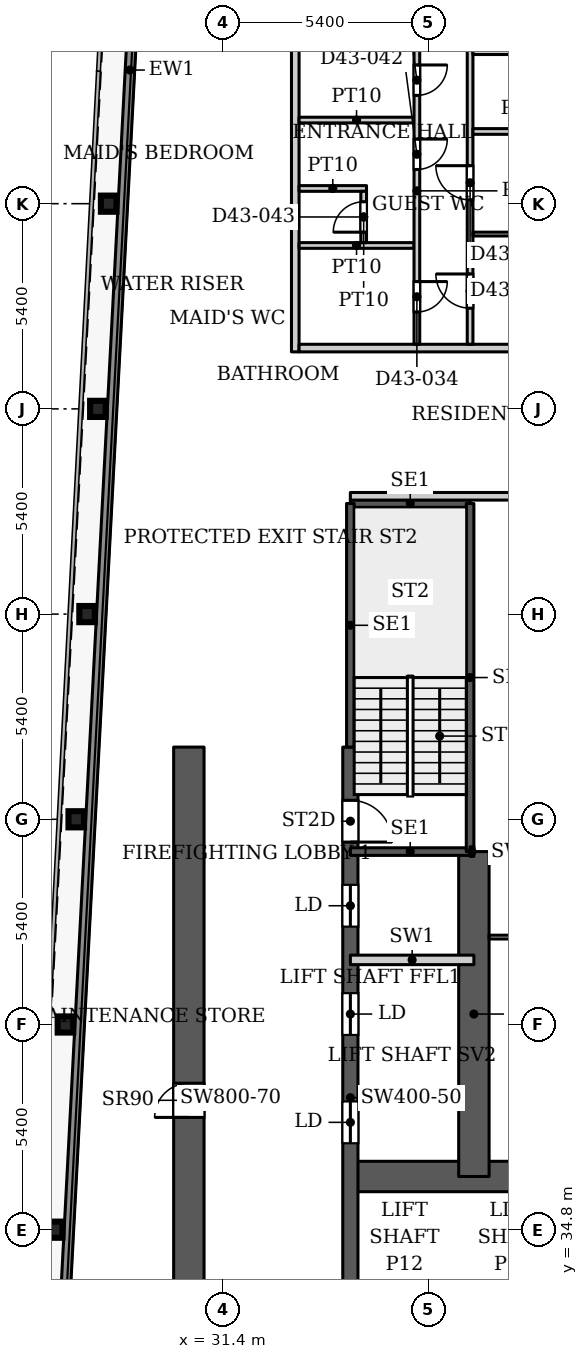
"""IFC4 building model, lengths in metres.
Left out: names, types, materials, properties, quantities, classifications, styles, units other than length and angle.
Written with IfcOpenShell. Run it as: python <this file> out.ifc"""

import sys

from ifc_helpers import new_model, si_unit, direction, frame, frame_2d, origin, origin_2d, place, context, subcontext, project, spatial, rectangle, i_section, extrude, source, transform, mapped, element, fill, save


model = new_model("IFC4")
c1 = context("Model", 3, precision=1e-05, world=origin(), true_north=direction((0.0, 1.0)))
c2 = subcontext(c1, "Body", "Model", "MODEL_VIEW")
j1 = project(units=[si_unit("LENGTHUNIT", "METRE"), si_unit("PLANEANGLEUNIT", "RADIAN")], contexts=[c1])
p1 = place(None, origin())
s1 = spatial("IfcSite", under=j1, at=p1, CompositionType="ELEMENT")
p2 = place(p1, origin())
s2 = spatial("IfcBuilding", under=s1, at=p2, CompositionType="ELEMENT")
p3 = place(p2, frame((0.0, 0.0, 191.6)))
s3 = spatial("IfcBuildingStorey", under=s2, at=p3, CompositionType="ELEMENT", Elevation=191.6)
for number, where, z_axis, x_axis in (
    (1, (26.969, 34.8, 0.0), (0.0, 0.0, 1.0), (1.0, 0.0, 0.0)),
    (2, (27.253, 40.2, 0.0), (0.0, 0.0, 1.0), (1.0, 0.0, 0.0)),
    (3, (27.537, 45.6, 0.0), (0.0, 0.0, 1.0), (1.0, 0.0, 0.0)),
    (4, (27.822, 51.0, 0.0), (0.0, 0.0, 1.0), (1.0, 0.0, 0.0)),
    (5, (28.106, 56.4, 0.0), (0.0, 0.0, 1.0), (1.0, 0.0, 0.0)),
    (6, (28.39, 61.8, 0.0), (0.0, 0.0, 1.0), (1.0, 0.0, 0.0)),
):
    element("IfcColumn", number, at=place(p3, frame(where, z_axis=z_axis, x_axis=x_axis)), inside=s3, PredefinedType="COLUMN", context=c2, shape_type="SweptSolid", body=[
        extrude(i_section(OverallWidth=0.409, OverallDepth=0.425, WebThickness=0.033, FlangeThickness=0.052, FilletRadius=0.013, at=origin_2d()), origin(), (0.0, 0.0, 1.0), 3.9),
    ])
p4 = place(p3, frame((34.75, 36.2, 0.0), z_axis=(0.0, 0.0, 1.0), x_axis=(1.0, 0.0, 0.0)))
e7 = element("IfcWall", 7, at=p4, inside=s3, PredefinedType="SHEAR", context=c2, shape_type="SweptSolid", body=[
    extrude(rectangle(XDim=18.4, YDim=0.8, at=frame_2d((9.2, 0.0))), origin(), (0.0, 0.0, 1.0), 3.9),
])
p5 = place(p4, frame((16.9, 0.0, 0.0)))
e8 = element("IfcOpeningElement", 8, at=p5, cuts=e7, PredefinedType="OPENING", context=c2, shape_type="SweptSolid", body=[
    extrude(rectangle(XDim=1.0, YDim=2.2, at=frame_2d((0.5, 1.1))), frame((0.0, 0.41, 0.0), z_axis=(0.0, -1.0, 0.0), x_axis=(1.0, 0.0, 0.0)), (0.0, 0.0, 1.0), 0.82),
])
p6 = place(p3, frame((34.75, 29.05, 0.0), z_axis=(0.0, 0.0, 1.0), x_axis=(0.0, 1.0, 0.0)))
e9 = element("IfcWall", 9, at=p6, inside=s3, PredefinedType="SHEAR", context=c2, shape_type="SweptSolid", body=[
    extrude(rectangle(XDim=18.45, YDim=0.4, at=frame_2d((9.225, 0.0))), origin(), (0.0, 0.0, 1.0), 3.9),
])
p7 = place(p6, frame((8.025, 0.0, 0.0)))
e10 = element("IfcOpeningElement", 10, at=p7, cuts=e9, PredefinedType="OPENING", context=c2, shape_type="SweptSolid", body=[
    extrude(rectangle(XDim=1.1, YDim=2.2, at=frame_2d((0.55, 1.1))), frame((0.0, 0.21, 0.0), z_axis=(0.0, -1.0, 0.0), x_axis=(1.0, 0.0, 0.0)), (0.0, 0.0, 1.0), 0.42),
])
p8 = place(p6, frame((10.875, 0.0, 0.0)))
e11 = element("IfcOpeningElement", 11, at=p8, cuts=e9, PredefinedType="OPENING", context=c2, shape_type="SweptSolid", body=[
    extrude(rectangle(XDim=1.1, YDim=2.2, at=frame_2d((0.55, 1.1))), frame((0.0, 0.21, 0.0), z_axis=(0.0, -1.0, 0.0), x_axis=(1.0, 0.0, 0.0)), (0.0, 0.0, 1.0), 0.42),
])
p9 = place(p6, frame((13.725, 0.0, 0.0)))
e12 = element("IfcOpeningElement", 12, at=p9, cuts=e9, PredefinedType="OPENING", context=c2, shape_type="SweptSolid", body=[
    extrude(rectangle(XDim=1.1, YDim=2.2, at=frame_2d((0.55, 1.1))), frame((0.0, 0.21, 0.0), z_axis=(0.0, -1.0, 0.0), x_axis=(1.0, 0.0, 0.0)), (0.0, 0.0, 1.0), 0.42),
])
p10 = place(p6, frame((15.95, 0.0, 0.0)))
e13 = element("IfcOpeningElement", 13, at=p10, cuts=e9, PredefinedType="OPENING", context=c2, shape_type="SweptSolid", body=[
    extrude(rectangle(XDim=1.1, YDim=2.2, at=frame_2d((0.55, 1.1))), frame((0.0, 0.21, 0.0), z_axis=(0.0, -1.0, 0.0), x_axis=(1.0, 0.0, 0.0)), (0.0, 0.0, 1.0), 0.42),
])
p11 = place(p3, frame((38.0, 36.2, 0.0), z_axis=(0.0, 0.0, 1.0), x_axis=(0.0, 1.0, 0.0)))
e14 = element("IfcWall", 14, at=p11, inside=s3, PredefinedType="SHEAR", context=c2, shape_type="SweptSolid", body=[
    extrude(rectangle(XDim=8.55, YDim=0.8, at=frame_2d((4.275, 0.0))), origin(), (0.0, 0.0, 1.0), 3.9),
])
p12 = place(p3, frame((30.5, 29.05, 0.0), z_axis=(0.0, 0.0, 1.0), x_axis=(0.0, 1.0, 0.0)))
e15 = element("IfcWall", 15, at=p12, inside=s3, PredefinedType="SHEAR", context=c2, shape_type="SweptSolid", body=[
    extrude(rectangle(XDim=18.45, YDim=0.8, at=frame_2d((9.225, 0.0))), origin(), (0.0, 0.0, 1.0), 3.9),
])
p13 = place(p12, frame((1.5, 0.0, 0.0)))
e16 = element("IfcOpeningElement", 16, at=p13, cuts=e15, PredefinedType="OPENING", context=c2, shape_type="SweptSolid", body=[
    extrude(rectangle(XDim=0.9, YDim=2.2, at=frame_2d((0.45, 1.1))), frame((0.0, 0.41, 0.0), z_axis=(0.0, -1.0, 0.0), x_axis=(1.0, 0.0, 0.0)), (0.0, 0.0, 1.0), 0.82),
])
p14 = place(p12, frame((8.705, 0.0, 0.0)))
e17 = element("IfcOpeningElement", 17, at=p14, cuts=e15, PredefinedType="OPENING", context=c2, shape_type="SweptSolid", body=[
    extrude(rectangle(XDim=0.9, YDim=2.2, at=frame_2d((0.45, 1.1))), frame((0.0, 0.41, 0.0), z_axis=(0.0, -1.0, 0.0), x_axis=(1.0, 0.0, 0.0)), (0.0, 0.0, 1.0), 0.82),
])
p15 = place(p3, frame((27.195, 31.969, 0.0), z_axis=(0.0, 0.0, 1.0), x_axis=(0.052554995867, 0.998618031286, 0.0)))
e18 = element("IfcWall", 18, at=p15, inside=s3, PredefinedType="SOLIDWALL", context=c2, shape_type="SweptSolid", body=[
    extrude(rectangle(XDim=66.787, YDim=0.25, at=frame_2d((33.394, 0.0))), origin(), (0.0, 0.0, 1.0), 3.75),
])
for number, where, z_axis, x_axis in (
    (19, (34.75, 44.75, 0.0), (0.0, 0.0, 1.0), (1.0, 0.0, 0.0)),
    (20, (34.75, 53.91, 0.0), (0.0, 0.0, 1.0), (1.0, 0.0, 0.0)),
):
    element("IfcWall", number, at=place(p3, frame(where, z_axis=z_axis, x_axis=x_axis)), inside=s3, PredefinedType="SHEAR", context=c2, shape_type="SweptSolid", body=[
        extrude(rectangle(XDim=3.15, YDim=0.2, at=frame_2d((1.575, 0.0))), origin(), (0.0, 0.0, 1.0), 3.9),
    ])
p16 = place(p3, frame((34.75, 47.5, 0.0), z_axis=(0.0, 0.0, 1.0), x_axis=(0.0, 1.0, 0.0)))
e21 = element("IfcWall", 21, at=p16, inside=s3, PredefinedType="SHEAR", context=c2, shape_type="SweptSolid", body=[
    extrude(rectangle(XDim=6.41, YDim=0.2, at=frame_2d((3.205, 0.0))), origin(), (0.0, 0.0, 1.0), 3.9),
])
p17 = place(p3, frame((37.9, 44.75, 0.0), z_axis=(0.0, 0.0, 1.0), x_axis=(0.0, 1.0, 0.0)))
e22 = element("IfcWall", 22, at=p17, inside=s3, PredefinedType="SHEAR", context=c2, shape_type="SweptSolid", body=[
    extrude(rectangle(XDim=9.16, YDim=0.2, at=frame_2d((4.58, 0.0))), origin(), (0.0, 0.0, 1.0), 3.9),
])
p18 = place(p3, frame((34.75, 41.9, 0.0), z_axis=(0.0, 0.0, 1.0), x_axis=(1.0, 0.0, 0.0)))
e23 = element("IfcWall", 23, at=p18, inside=s3, PredefinedType="PARTITIONING", context=c2, shape_type="SweptSolid", body=[
    extrude(rectangle(XDim=3.25, YDim=0.25, at=frame_2d((1.625, 0.0))), origin(), (0.0, 0.0, 1.0), 3.9),
])
p19 = place(p3, frame((37.9, 44.75, 0.0), z_axis=(0.0, 0.0, 1.0), x_axis=(1.0, 0.0, 0.0)))
e24 = element("IfcWall", 24, at=p19, inside=s3, PredefinedType="PARTITIONING", context=c2, shape_type="SweptSolid", body=[
    extrude(rectangle(XDim=0.1, YDim=0.25, at=frame_2d((0.05, 0.0))), origin(), (0.0, 0.0, 1.0), 3.9),
])
p20 = place(p3, frame((33.3, 57.9, 0.0), z_axis=(0.0, 0.0, 1.0), x_axis=(0.0, 1.0, 0.0)))
e25 = element("IfcWall", 25, at=p20, inside=s3, PredefinedType="PARTITIONING", context=c2, shape_type="SweptSolid", body=[
    extrude(rectangle(XDim=17.6, YDim=0.2, at=frame_2d((8.8, 0.0))), origin(), (0.0, 0.0, 1.0), 3.6),
])
p21 = place(p20, frame((8.9, 0.0, 0.0)))
e26 = element("IfcOpeningElement", 26, at=p21, cuts=e25, PredefinedType="OPENING", context=c2, shape_type="SweptSolid", body=[
    extrude(rectangle(XDim=1.0, YDim=2.1, at=frame_2d((0.5, 1.05))), frame((0.0, 0.11, 0.0), z_axis=(0.0, -1.0, 0.0), x_axis=(1.0, 0.0, 0.0)), (0.0, 0.0, 1.0), 0.22),
])
p22 = place(p3, frame((33.4, 58.0, 0.0), z_axis=(0.0, 0.0, 1.0), x_axis=(1.0, 0.0, 0.0)))
e27 = element("IfcWall", 27, at=p22, inside=s3, PredefinedType="PARTITIONING", context=c2, shape_type="SweptSolid", body=[
    extrude(rectangle(XDim=12.5, YDim=0.2, at=frame_2d((6.25, 0.0))), origin(), (0.0, 0.0, 1.0), 3.6),
])
p23 = place(p3, frame((33.4, 60.7, 0.0), z_axis=(0.0, 0.0, 1.0), x_axis=(1.0, 0.0, 0.0)))
e28 = element("IfcWall", 28, at=p23, inside=s3, PredefinedType="PARTITIONING", context=c2, shape_type="SweptSolid", body=[
    extrude(rectangle(XDim=3.025, YDim=0.15, at=frame_2d((1.513, 0.0))), origin(), (0.0, 0.0, 1.0), 3.6),
])
p24 = place(p3, frame((33.4, 62.2, 0.0), z_axis=(0.0, 0.0, 1.0), x_axis=(1.0, 0.0, 0.0)))
e29 = element("IfcWall", 29, at=p24, inside=s3, PredefinedType="PARTITIONING", context=c2, shape_type="SweptSolid", body=[
    extrude(rectangle(XDim=1.775, YDim=0.15, at=frame_2d((0.888, 0.0))), origin(), (0.0, 0.0, 1.0), 3.6),
])
p25 = place(p3, frame((33.4, 64.0, 0.0), z_axis=(0.0, 0.0, 1.0), x_axis=(1.0, 0.0, 0.0)))
e30 = element("IfcWall", 30, at=p25, inside=s3, PredefinedType="PARTITIONING", context=c2, shape_type="SweptSolid", body=[
    extrude(rectangle(XDim=3.025, YDim=0.15, at=frame_2d((1.513, 0.0))), origin(), (0.0, 0.0, 1.0), 3.6),
])
p26 = place(p3, frame((34.75, 54.1, 0.0), z_axis=(0.0, 0.0, 1.0), x_axis=(1.0, 0.0, 0.0)))
e31 = element("IfcWall", 31, at=p26, inside=s3, PredefinedType="PARTITIONING", context=c2, shape_type="SweptSolid", body=[
    extrude(rectangle(XDim=11.15, YDim=0.2, at=frame_2d((5.575, 0.0))), origin(), (0.0, 0.0, 1.0), 3.6),
])
p27 = place(p26, frame((5.075, 0.0, 0.0)))
e32 = element("IfcOpeningElement", 32, at=p27, cuts=e31, PredefinedType="OPENING", context=c2, shape_type="SweptSolid", body=[
    extrude(rectangle(XDim=1.0, YDim=2.1, at=frame_2d((0.5, 1.05))), frame((0.0, 0.11, 0.0), z_axis=(0.0, -1.0, 0.0), x_axis=(1.0, 0.0, 0.0)), (0.0, 0.0, 1.0), 0.22),
])
p28 = place(p3, frame((35.1, 60.775, 0.0), z_axis=(0.0, 0.0, 1.0), x_axis=(0.0, 1.0, 0.0)))
e33 = element("IfcWall", 33, at=p28, inside=s3, PredefinedType="PARTITIONING", context=c2, shape_type="SweptSolid", body=[
    extrude(rectangle(XDim=1.35, YDim=0.15, at=frame_2d((0.675, 0.0))), origin(), (0.0, 0.0, 1.0), 3.6),
])
p29 = place(p28, frame((0.275, 0.0, 0.0)))
e34 = element("IfcOpeningElement", 34, at=p29, cuts=e33, PredefinedType="OPENING", context=c2, shape_type="SweptSolid", body=[
    extrude(rectangle(XDim=0.8, YDim=2.1, at=frame_2d((0.4, 1.05))), frame((0.0, 0.085, 0.0), z_axis=(0.0, -1.0, 0.0), x_axis=(1.0, 0.0, 0.0)), (0.0, 0.0, 1.0), 0.17),
])
p30 = place(p3, frame((36.5, 58.1, 0.0), z_axis=(0.0, 0.0, 1.0), x_axis=(0.0, 1.0, 0.0)))
e35 = element("IfcWall", 35, at=p30, inside=s3, PredefinedType="PARTITIONING", context=c2, shape_type="SweptSolid", body=[
    extrude(rectangle(XDim=8.075, YDim=0.15, at=frame_2d((4.038, 0.0))), origin(), (0.0, 0.0, 1.0), 3.6),
])
p31 = place(p30, frame((0.85, 0.0, 0.0)))
e36 = element("IfcOpeningElement", 36, at=p31, cuts=e35, PredefinedType="OPENING", context=c2, shape_type="SweptSolid", body=[
    extrude(rectangle(XDim=0.8, YDim=2.1, at=frame_2d((0.4, 1.05))), frame((0.0, 0.085, 0.0), z_axis=(0.0, -1.0, 0.0), x_axis=(1.0, 0.0, 0.0)), (0.0, 0.0, 1.0), 0.17),
])
p32 = place(p30, frame((4.6, 0.0, 0.0)))
e37 = element("IfcOpeningElement", 37, at=p32, cuts=e35, PredefinedType="OPENING", context=c2, shape_type="SweptSolid", body=[
    extrude(rectangle(XDim=0.8, YDim=2.1, at=frame_2d((0.4, 1.05))), frame((0.0, 0.085, 0.0), z_axis=(0.0, -1.0, 0.0), x_axis=(1.0, 0.0, 0.0)), (0.0, 0.0, 1.0), 0.17),
])
p33 = place(p30, frame((6.55, 0.0, 0.0)))
e38 = element("IfcOpeningElement", 38, at=p33, cuts=e35, PredefinedType="OPENING", context=c2, shape_type="SweptSolid", body=[
    extrude(rectangle(XDim=0.8, YDim=2.1, at=frame_2d((0.4, 1.05))), frame((0.0, 0.085, 0.0), z_axis=(0.0, -1.0, 0.0), x_axis=(1.0, 0.0, 0.0)), (0.0, 0.0, 1.0), 0.17),
])
p34 = place(p3, frame((37.9, 58.1, 0.0), z_axis=(0.0, 0.0, 1.0), x_axis=(0.0, 1.0, 0.0)))
e39 = element("IfcWall", 39, at=p34, inside=s3, PredefinedType="PARTITIONING", context=c2, shape_type="SweptSolid", body=[
    extrude(rectangle(XDim=17.2, YDim=0.15, at=frame_2d((8.6, 0.0))), origin(), (0.0, 0.0, 1.0), 3.6),
])
p35 = place(p34, frame((0.95, 0.0, 0.0)))
e40 = element("IfcOpeningElement", 40, at=p35, cuts=e39, PredefinedType="OPENING", context=c2, shape_type="SweptSolid", body=[
    extrude(rectangle(XDim=0.9, YDim=2.1, at=frame_2d((0.45, 1.05))), frame((0.0, 0.085, 0.0), z_axis=(0.0, -1.0, 0.0), x_axis=(1.0, 0.0, 0.0)), (0.0, 0.0, 1.0), 0.17),
])
p36 = place(p34, frame((15.2, 0.0, 0.0)))
e41 = element("IfcOpeningElement", 41, at=p36, cuts=e39, PredefinedType="OPENING", context=c2, shape_type="SweptSolid", body=[
    extrude(rectangle(XDim=0.9, YDim=2.1, at=frame_2d((0.45, 1.05))), frame((0.0, 0.085, 0.0), z_axis=(0.0, -1.0, 0.0), x_axis=(1.0, 0.0, 0.0)), (0.0, 0.0, 1.0), 0.17),
])
p37 = place(p34, frame((9.0, 0.0, 0.0)))
e42 = element("IfcOpeningElement", 42, at=p37, cuts=e39, PredefinedType="OPENING", context=c2, shape_type="SweptSolid", body=[
    extrude(rectangle(XDim=1.0, YDim=2.1, at=frame_2d((0.5, 1.05))), frame((0.0, 0.085, 0.0), z_axis=(0.0, -1.0, 0.0), x_axis=(1.0, 0.0, 0.0)), (0.0, 0.0, 1.0), 0.17),
])
p38 = place(p34, frame((12.2, 0.0, 0.0)))
e43 = element("IfcOpeningElement", 43, at=p38, cuts=e39, PredefinedType="OPENING", context=c2, shape_type="SweptSolid", body=[
    extrude(rectangle(XDim=0.9, YDim=2.1, at=frame_2d((0.45, 1.05))), frame((0.0, 0.085, 0.0), z_axis=(0.0, -1.0, 0.0), x_axis=(1.0, 0.0, 0.0)), (0.0, 0.0, 1.0), 0.17),
])
p39 = place(p34, frame((3.8, 0.0, 0.0)))
e44 = element("IfcOpeningElement", 44, at=p39, cuts=e39, PredefinedType="OPENING", context=c2, shape_type="SweptSolid", body=[
    extrude(rectangle(XDim=0.9, YDim=2.1, at=frame_2d((0.45, 1.05))), frame((0.0, 0.085, 0.0), z_axis=(0.0, -1.0, 0.0), x_axis=(1.0, 0.0, 0.0)), (0.0, 0.0, 1.0), 0.17),
])
p40 = place(p3, frame((37.975, 61.0, 0.0), z_axis=(0.0, 0.0, 1.0), x_axis=(1.0, 0.0, 0.0)))
e45 = element("IfcWall", 45, at=p40, inside=s3, PredefinedType="PARTITIONING", context=c2, shape_type="SweptSolid", body=[
    extrude(rectangle(XDim=7.925, YDim=0.1, at=frame_2d((3.962, 0.0))), origin(), (0.0, 0.0, 1.0), 3.6),
])
p41 = place(p3, frame((37.975, 63.7, 0.0), z_axis=(0.0, 0.0, 1.0), x_axis=(1.0, 0.0, 0.0)))
e46 = element("IfcWall", 46, at=p41, inside=s3, PredefinedType="PARTITIONING", context=c2, shape_type="SweptSolid", body=[
    extrude(rectangle(XDim=2.8, YDim=0.15, at=frame_2d((1.4, 0.0))), origin(), (0.0, 0.0, 1.0), 3.6),
])
p42 = place(p3, frame((37.975, 65.8, 0.0), z_axis=(0.0, 0.0, 1.0), x_axis=(1.0, 0.0, 0.0)))
e47 = element("IfcWall", 47, at=p42, inside=s3, PredefinedType="PARTITIONING", context=c2, shape_type="SweptSolid", body=[
    extrude(rectangle(XDim=7.925, YDim=0.15, at=frame_2d((3.962, 0.0))), origin(), (0.0, 0.0, 1.0), 3.6),
])
p43 = place(p3, frame((38.399, 42.5, 0.0), z_axis=(0.0, 0.0, 1.0), x_axis=(1.0, 0.0, 0.0)))
e48 = element("IfcWall", 48, at=p43, inside=s3, PredefinedType="PARTITIONING", context=c2, shape_type="SweptSolid", body=[
    extrude(rectangle(XDim=14.901, YDim=0.1, at=frame_2d((7.451, 0.0))), origin(), (0.0, 0.0, 1.0), 3.6),
])
p44 = place(p43, frame((6.801, 0.0, 0.0)))
e49 = element("IfcOpeningElement", 49, at=p44, cuts=e48, PredefinedType="OPENING", context=c2, shape_type="SweptSolid", body=[
    extrude(rectangle(XDim=1.0, YDim=2.1, at=frame_2d((0.5, 1.05))), frame((0.0, 0.06, 0.0), z_axis=(0.0, -1.0, 0.0), x_axis=(1.0, 0.0, 0.0)), (0.0, 0.0, 1.0), 0.12),
])
m1 = source(origin(), c2, "Body", "SweptSolid", [
    extrude(rectangle(XDim=1.1, YDim=2.2, at=frame_2d((0.55, 1.1))), frame((0.0, 0.025, 0.0), z_axis=(0.0, -1.0, 0.0), x_axis=(1.0, 0.0, 0.0)), (0.0, 0.0, 1.0), 0.05),
])
p45 = place(p7, origin())
e50 = element("IfcDoor", 50, at=p45, inside=s3, OperationType="SLIDING_TO_LEFT", PredefinedType="DOOR", context=c2, shape_type="MappedRepresentation", body=[
    mapped(m1, transform((0.0, 0.0, 0.0), x_axis=(1.0, 0.0, 0.0), y_axis=(0.0, 1.0, 0.0), z_axis=(0.0, 0.0, 1.0), scale=1.0)),
])
fill(e10, e50)
p46 = place(p8, origin())
e51 = element("IfcDoor", 51, at=p46, inside=s3, OperationType="SLIDING_TO_LEFT", PredefinedType="DOOR", context=c2, shape_type="MappedRepresentation", body=[
    mapped(m1, transform((0.0, 0.0, 0.0), x_axis=(1.0, 0.0, 0.0), y_axis=(0.0, 1.0, 0.0), z_axis=(0.0, 0.0, 1.0), scale=1.0)),
])
fill(e11, e51)
p47 = place(p9, origin())
e52 = element("IfcDoor", 52, at=p47, inside=s3, OperationType="SLIDING_TO_LEFT", PredefinedType="DOOR", context=c2, shape_type="MappedRepresentation", body=[
    mapped(m1, transform((0.0, 0.0, 0.0), x_axis=(1.0, 0.0, 0.0), y_axis=(0.0, 1.0, 0.0), z_axis=(0.0, 0.0, 1.0), scale=1.0)),
])
fill(e12, e52)
m2 = source(origin(), c2, "Body", "SweptSolid", [
    extrude(rectangle(XDim=0.9, YDim=2.2, at=frame_2d((0.45, 1.1))), frame((0.0, 0.025, 0.0), z_axis=(0.0, -1.0, 0.0), x_axis=(1.0, 0.0, 0.0)), (0.0, 0.0, 1.0), 0.05),
])
p48 = place(p14, origin())
e53 = element("IfcDoor", 53, at=p48, inside=s3, OperationType="SINGLE_SWING_LEFT", PredefinedType="DOOR", context=c2, shape_type="MappedRepresentation", body=[
    mapped(m2, transform((0.0, 0.0, 0.0), x_axis=(1.0, 0.0, 0.0), y_axis=(0.0, 1.0, 0.0), z_axis=(0.0, 0.0, 1.0), scale=1.0)),
])
fill(e17, e53)
m3 = source(origin(), c2, "Body", "SweptSolid", [
    extrude(rectangle(XDim=1.1, YDim=2.2, at=frame_2d((0.55, 1.1))), frame((0.0, 0.025, 0.0), z_axis=(0.0, -1.0, 0.0), x_axis=(1.0, 0.0, 0.0)), (0.0, 0.0, 1.0), 0.05),
])
p49 = place(p10, origin())
e54 = element("IfcDoor", 54, at=p49, inside=s3, OperationType="SINGLE_SWING_RIGHT", PredefinedType="DOOR", context=c2, shape_type="MappedRepresentation", body=[
    mapped(m3, transform((0.0, 0.0, 0.0), x_axis=(1.0, 0.0, 0.0), y_axis=(0.0, 1.0, 0.0), z_axis=(0.0, 0.0, 1.0), scale=1.0)),
])
fill(e13, e54)
m4 = source(origin(), c2, "Body", "SweptSolid", [
    extrude(rectangle(XDim=0.8, YDim=2.1, at=frame_2d((0.4, 1.05))), frame((0.0, 0.025, 0.0), z_axis=(0.0, -1.0, 0.0), x_axis=(1.0, 0.0, 0.0)), (0.0, 0.0, 1.0), 0.05),
])
p50 = place(p31, origin())
e55 = element("IfcDoor", 55, at=p50, inside=s3, OperationType="SINGLE_SWING_RIGHT", PredefinedType="DOOR", context=c2, shape_type="MappedRepresentation", body=[
    mapped(m4, transform((0.0, 0.0, 0.0), x_axis=(1.0, 0.0, 0.0), y_axis=(0.0, 1.0, 0.0), z_axis=(0.0, 0.0, 1.0), scale=1.0)),
])
fill(e36, e55)
m5 = source(origin(), c2, "Body", "SweptSolid", [
    extrude(rectangle(XDim=0.9, YDim=2.1, at=frame_2d((0.45, 1.05))), frame((0.0, 0.025, 0.0), z_axis=(0.0, -1.0, 0.0), x_axis=(1.0, 0.0, 0.0)), (0.0, 0.0, 1.0), 0.05),
])
p51 = place(p35, origin())
e56 = element("IfcDoor", 56, at=p51, inside=s3, OperationType="SINGLE_SWING_LEFT", PredefinedType="DOOR", context=c2, shape_type="MappedRepresentation", body=[
    mapped(m5, transform((0.0, 0.0, 0.0), x_axis=(1.0, 0.0, 0.0), y_axis=(0.0, 1.0, 0.0), z_axis=(0.0, 0.0, 1.0), scale=1.0)),
])
fill(e40, e56)
p52 = place(p32, origin())
e57 = element("IfcDoor", 57, at=p52, inside=s3, OperationType="SINGLE_SWING_RIGHT", PredefinedType="DOOR", context=c2, shape_type="MappedRepresentation", body=[
    mapped(m4, transform((0.0, 0.0, 0.0), x_axis=(1.0, 0.0, 0.0), y_axis=(0.0, 1.0, 0.0), z_axis=(0.0, 0.0, 1.0), scale=1.0)),
])
fill(e37, e57)
p53 = place(p29, origin())
e58 = element("IfcDoor", 58, at=p53, inside=s3, OperationType="SINGLE_SWING_LEFT", PredefinedType="DOOR", context=c2, shape_type="MappedRepresentation", body=[
    mapped(m4, transform((0.0, 0.0, 0.0), x_axis=(1.0, 0.0, 0.0), y_axis=(0.0, 1.0, 0.0), z_axis=(0.0, 0.0, 1.0), scale=1.0)),
])
fill(e34, e58)
p54 = place(p39, origin())
e59 = element("IfcDoor", 59, at=p54, inside=s3, OperationType="SINGLE_SWING_LEFT", PredefinedType="DOOR", context=c2, shape_type="MappedRepresentation", body=[
    mapped(m5, transform((0.0, 0.0, 0.0), x_axis=(1.0, 0.0, 0.0), y_axis=(0.0, 1.0, 0.0), z_axis=(0.0, 0.0, 1.0), scale=1.0)),
])
fill(e44, e59)
p55 = place(p33, origin())
e60 = element("IfcDoor", 60, at=p55, inside=s3, OperationType="SINGLE_SWING_RIGHT", PredefinedType="DOOR", context=c2, shape_type="MappedRepresentation", body=[
    mapped(m4, transform((0.0, 0.0, 0.0), x_axis=(1.0, 0.0, 0.0), y_axis=(0.0, 1.0, 0.0), z_axis=(0.0, 0.0, 1.0), scale=1.0)),
])
fill(e38, e60)
save(model, sys.argv[1])
